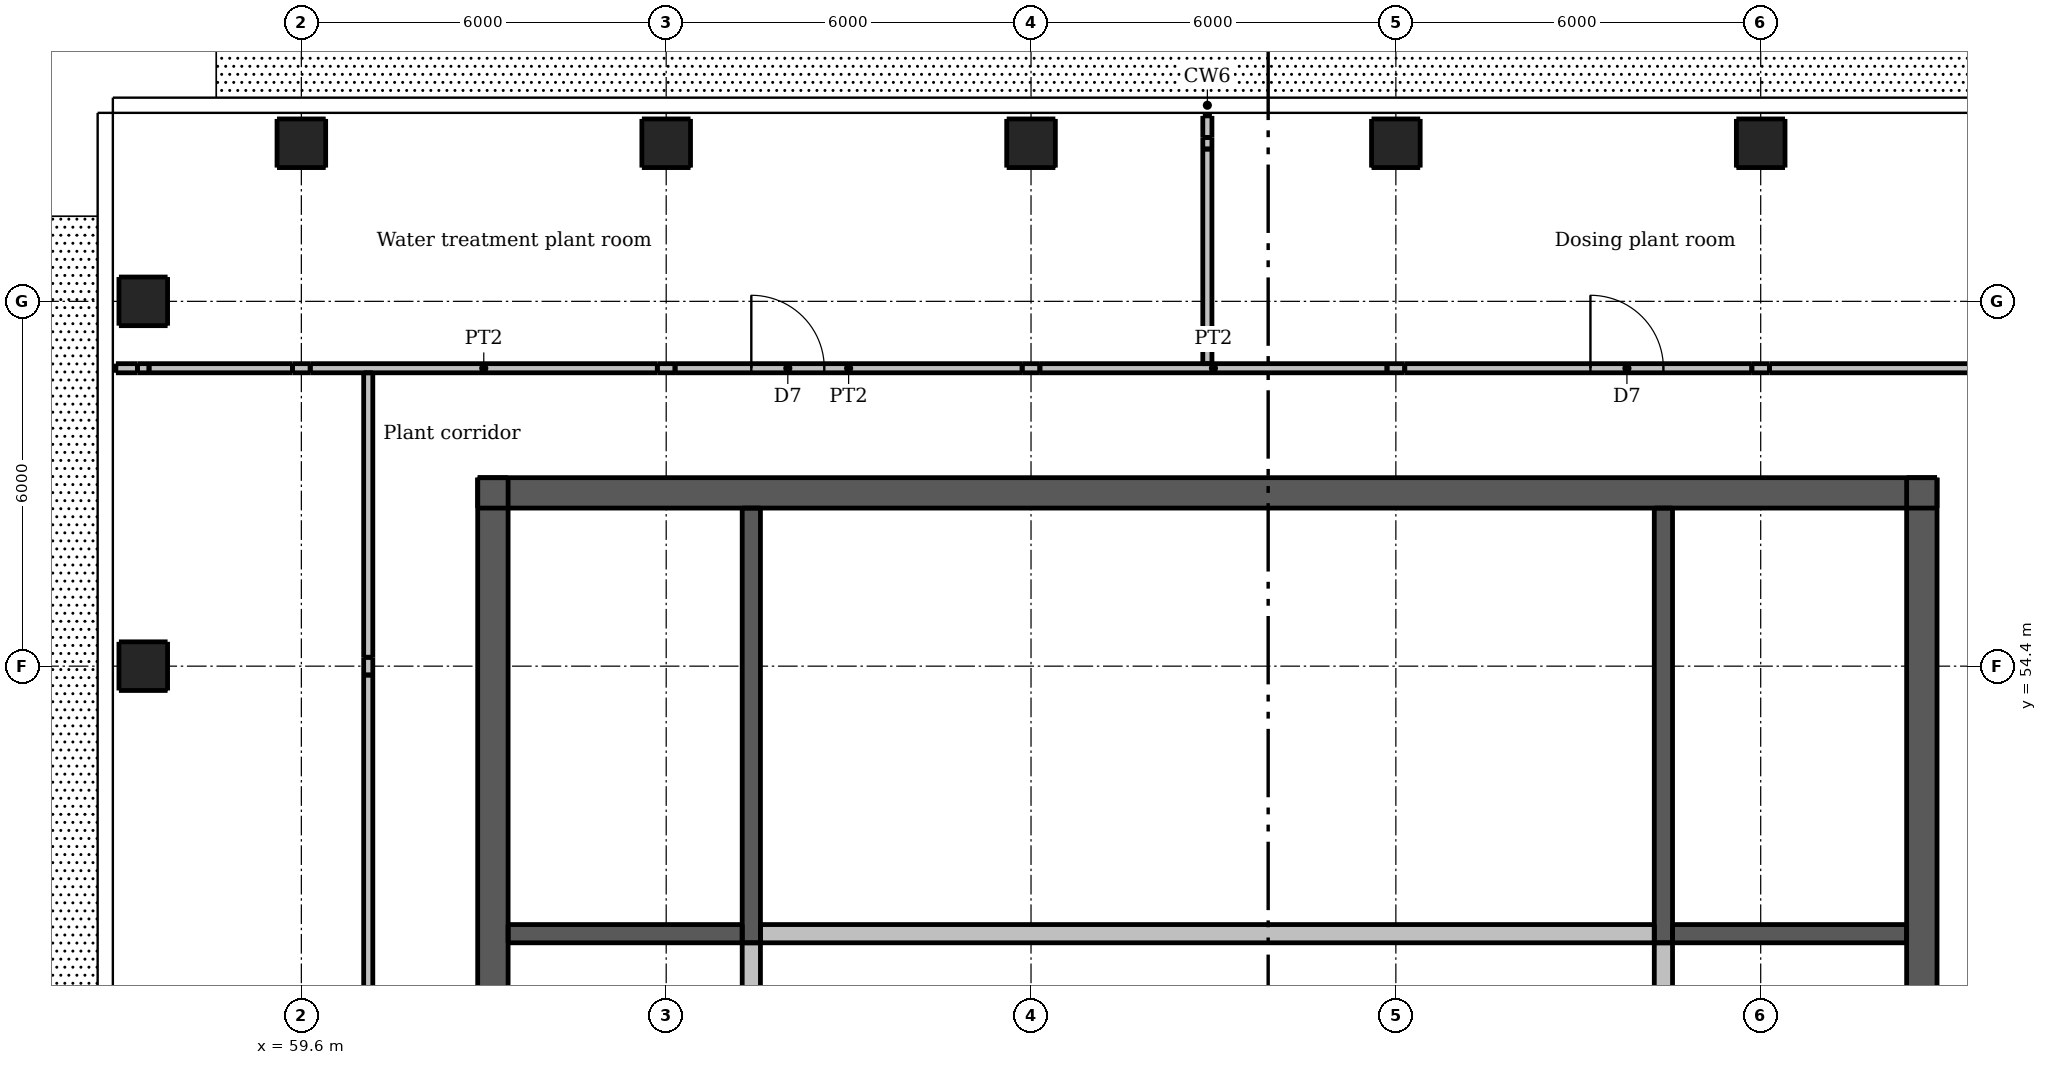
"""IFC4 building model, lengths in metres.
Left out: names, types, materials, properties, quantities, classifications, styles, units other than length and angle.
Written with IfcOpenShell. Run it as: python <this file> out.ifc"""

import sys

from ifc_helpers import new_model, si_unit, direction, frame, frame_2d, origin, origin_2d, place, context, subcontext, project, spatial, rectangle, extrude, element, fill, save


model = new_model("IFC4")
c1 = context("Model", 3, precision=1e-05, world=origin(), true_north=direction((0.0, 1.0)))
c2 = subcontext(c1, "Body", "Model", "MODEL_VIEW")
j1 = project(units=[si_unit("LENGTHUNIT", "METRE"), si_unit("PLANEANGLEUNIT", "RADIAN")], contexts=[c1])
p1 = place(None, origin())
s1 = spatial("IfcSite", under=j1, at=p1, CompositionType="ELEMENT")
p2 = place(p1, origin())
s2 = spatial("IfcBuilding", under=s1, at=p2, CompositionType="ELEMENT")
p3 = place(p2, frame((0.0, 0.0, 290.8)))
s3 = spatial("IfcBuildingStorey", under=s2, at=p3, CompositionType="ELEMENT", Elevation=290.8)
p4 = place(p3, frame((62.5, 57.25, 0.0), z_axis=(0.0, 0.0, 1.0), x_axis=(1.0, 0.0, 0.0)))
e1 = element("IfcWall", 1, at=p4, inside=s3, PredefinedType="SHEAR", context=c2, shape_type="SweptSolid", body=[
    extrude(rectangle(XDim=24.0, YDim=0.5, at=frame_2d((12.0, 0.0))), origin(), (0.0, 0.0, 1.0), 3.3),
])
p5 = place(p4, frame((21.025, 0.0, 0.0)))
e2 = element("IfcOpeningElement", 2, at=p5, cuts=e1, PredefinedType="OPENING", context=c2, shape_type="SweptSolid", body=[
    extrude(rectangle(XDim=1.1, YDim=2.1, at=frame_2d((0.55, 1.05))), frame((0.0, 0.26, 0.0), z_axis=(0.0, -1.0, 0.0), x_axis=(1.0, 0.0, 0.0)), (0.0, 0.0, 1.0), 0.52),
])
p6 = place(p4, frame((1.875, 0.0, 0.0)))
e3 = element("IfcOpeningElement", 3, at=p6, cuts=e1, PredefinedType="OPENING", context=c2, shape_type="SweptSolid", body=[
    extrude(rectangle(XDim=1.1, YDim=2.1, at=frame_2d((0.55, 1.05))), frame((0.0, 0.26, 0.0), z_axis=(0.0, -1.0, 0.0), x_axis=(1.0, 0.0, 0.0)), (0.0, 0.0, 1.0), 0.52),
])
p7 = place(p4, frame((11.55, 0.0, 0.0)))
e4 = element("IfcOpeningElement", 4, at=p7, cuts=e1, PredefinedType="OPENING", context=c2, shape_type="SweptSolid", body=[
    extrude(rectangle(XDim=0.9, YDim=2.1, at=frame_2d((0.45, 1.05))), frame((0.0, 0.26, 0.0), z_axis=(0.0, -1.0, 0.0), x_axis=(1.0, 0.0, 0.0)), (0.0, 0.0, 1.0), 0.52),
])
p8 = place(p3, frame((62.75, 33.5, 0.0), z_axis=(0.0, 0.0, 1.0), x_axis=(0.0, 1.0, 0.0)))
e5 = element("IfcWall", 5, at=p8, inside=s3, PredefinedType="SHEAR", context=c2, shape_type="SweptSolid", body=[
    extrude(rectangle(XDim=24.0, YDim=0.5, at=frame_2d((12.0, 0.0))), origin(), (0.0, 0.0, 1.0), 3.3),
])
p9 = place(p8, frame((11.55, 0.0, 0.0)))
e6 = element("IfcOpeningElement", 6, at=p9, cuts=e5, PredefinedType="OPENING", context=c2, shape_type="SweptSolid", body=[
    extrude(rectangle(XDim=0.9, YDim=2.1, at=frame_2d((0.45, 1.05))), frame((0.0, 0.26, 0.0), z_axis=(0.0, -1.0, 0.0), x_axis=(1.0, 0.0, 0.0)), (0.0, 0.0, 1.0), 0.52),
])
p10 = place(p3, frame((86.25, 33.5, 0.0), z_axis=(0.0, 0.0, 1.0), x_axis=(0.0, 1.0, 0.0)))
e7 = element("IfcWall", 7, at=p10, inside=s3, PredefinedType="SHEAR", context=c2, shape_type="SweptSolid", body=[
    extrude(rectangle(XDim=24.0, YDim=0.5, at=frame_2d((12.0, 0.0))), origin(), (0.0, 0.0, 1.0), 3.3),
])
p11 = place(p10, frame((11.55, 0.0, 0.0)))
e8 = element("IfcOpeningElement", 8, at=p11, cuts=e7, PredefinedType="OPENING", context=c2, shape_type="SweptSolid", body=[
    extrude(rectangle(XDim=0.9, YDim=2.1, at=frame_2d((0.45, 1.05))), frame((0.0, 0.26, 0.0), z_axis=(0.0, -1.0, 0.0), x_axis=(1.0, 0.0, 0.0)), (0.0, 0.0, 1.0), 0.52),
])
for number, where, z_axis, x_axis in (
    (9, (59.6, 63.0, 0.0), (0.0, 0.0, 1.0), (1.0, 0.0, 0.0)),
    (10, (65.6, 63.0, 0.0), (0.0, 0.0, 1.0), (1.0, 0.0, 0.0)),
    (11, (71.6, 63.0, 0.0), (0.0, 0.0, 1.0), (1.0, 0.0, 0.0)),
    (12, (77.6, 63.0, 0.0), (0.0, 0.0, 1.0), (1.0, 0.0, 0.0)),
    (13, (83.6, 63.0, 0.0), (0.0, 0.0, 1.0), (1.0, 0.0, 0.0)),
    (14, (57.0, 54.4, 0.0), (0.0, 0.0, 1.0), (1.0, 0.0, 0.0)),
    (15, (57.0, 60.4, 0.0), (0.0, 0.0, 1.0), (1.0, 0.0, 0.0)),
):
    element("IfcColumn", number, at=place(p3, frame(where, z_axis=z_axis, x_axis=x_axis)), inside=s3, PredefinedType="COLUMN", context=c2, shape_type="SweptSolid", body=[
        extrude(rectangle(XDim=0.8, YDim=0.8, at=origin_2d()), origin(), (0.0, 0.0, 1.0), 3.3),
    ])
p12 = place(p3, frame((67.0, 41.15, 0.0), z_axis=(0.0, 0.0, 1.0), x_axis=(0.0, 1.0, 0.0)))
e16 = element("IfcWall", 16, at=p12, inside=s3, PredefinedType="PARTITIONING", context=c2, shape_type="SweptSolid", body=[
    extrude(rectangle(XDim=8.7, YDim=0.3, at=frame_2d((4.35, 0.0))), origin(), (0.0, 0.0, 1.0), 3.3),
])
p13 = place(p12, frame((3.9, 0.0, 0.0)))
e17 = element("IfcOpeningElement", 17, at=p13, cuts=e16, PredefinedType="OPENING", context=c2, shape_type="SweptSolid", body=[
    extrude(rectangle(XDim=0.9, YDim=2.1, at=frame_2d((0.45, 1.05))), frame((0.0, 0.16, 0.0), z_axis=(0.0, -1.0, 0.0), x_axis=(1.0, 0.0, 0.0)), (0.0, 0.0, 1.0), 0.32),
])
p14 = place(p3, frame((67.0, 49.85, 0.0), z_axis=(0.0, 0.0, 1.0), x_axis=(0.0, 1.0, 0.0)))
e18 = element("IfcWall", 18, at=p14, inside=s3, PredefinedType="SHEAR", context=c2, shape_type="SweptSolid", body=[
    extrude(rectangle(XDim=7.15, YDim=0.3, at=frame_2d((3.575, 0.0))), origin(), (0.0, 0.0, 1.0), 3.3),
])
p15 = place(p14, frame((5.85, 0.0, 0.0)))
e19 = element("IfcOpeningElement", 19, at=p15, cuts=e18, PredefinedType="OPENING", context=c2, shape_type="SweptSolid", body=[
    extrude(rectangle(XDim=1.1, YDim=2.1, at=frame_2d((0.55, 1.05))), frame((0.0, 0.16, 0.0), z_axis=(0.0, -1.0, 0.0), x_axis=(1.0, 0.0, 0.0)), (0.0, 0.0, 1.0), 0.32),
])
p16 = place(p3, frame((82.0, 41.15, 0.0), z_axis=(0.0, 0.0, 1.0), x_axis=(0.0, 1.0, 0.0)))
e20 = element("IfcWall", 20, at=p16, inside=s3, PredefinedType="PARTITIONING", context=c2, shape_type="SweptSolid", body=[
    extrude(rectangle(XDim=8.7, YDim=0.3, at=frame_2d((4.35, 0.0))), origin(), (0.0, 0.0, 1.0), 3.3),
])
p17 = place(p16, frame((3.9, 0.0, 0.0)))
e21 = element("IfcOpeningElement", 21, at=p17, cuts=e20, PredefinedType="OPENING", context=c2, shape_type="SweptSolid", body=[
    extrude(rectangle(XDim=0.9, YDim=2.1, at=frame_2d((0.45, 1.05))), frame((0.0, 0.16, 0.0), z_axis=(0.0, -1.0, 0.0), x_axis=(1.0, 0.0, 0.0)), (0.0, 0.0, 1.0), 0.32),
])
p18 = place(p3, frame((82.0, 49.85, 0.0), z_axis=(0.0, 0.0, 1.0), x_axis=(0.0, 1.0, 0.0)))
e22 = element("IfcWall", 22, at=p18, inside=s3, PredefinedType="SHEAR", context=c2, shape_type="SweptSolid", body=[
    extrude(rectangle(XDim=7.15, YDim=0.3, at=frame_2d((3.575, 0.0))), origin(), (0.0, 0.0, 1.0), 3.3),
])
p19 = place(p18, frame((5.85, 0.0, 0.0)))
e23 = element("IfcOpeningElement", 23, at=p19, cuts=e22, PredefinedType="OPENING", context=c2, shape_type="SweptSolid", body=[
    extrude(rectangle(XDim=1.1, YDim=2.1, at=frame_2d((0.55, 1.05))), frame((0.0, 0.16, 0.0), z_axis=(0.0, -1.0, 0.0), x_axis=(1.0, 0.0, 0.0)), (0.0, 0.0, 1.0), 0.32),
])
for number, where, z_axis, x_axis in (
    (24, (63.0, 50.0, 0.0), (0.0, 0.0, 1.0), (1.0, 0.0, 0.0)),
    (25, (82.15, 50.0, 0.0), (0.0, 0.0, 1.0), (1.0, 0.0, 0.0)),
):
    element("IfcWall", number, at=place(p3, frame(where, z_axis=z_axis, x_axis=x_axis)), inside=s3, PredefinedType="SHEAR", context=c2, shape_type="SweptSolid", body=[
        extrude(rectangle(XDim=3.85, YDim=0.3, at=frame_2d((1.925, 0.0))), origin(), (0.0, 0.0, 1.0), 3.3),
    ])
p20 = place(p3, frame((67.15, 50.0, 0.0), z_axis=(0.0, 0.0, 1.0), x_axis=(1.0, 0.0, 0.0)))
e26 = element("IfcWall", 26, at=p20, inside=s3, PredefinedType="PARTITIONING", context=c2, shape_type="SweptSolid", body=[
    extrude(rectangle(XDim=14.7, YDim=0.3, at=frame_2d((7.35, 0.0))), origin(), (0.0, 0.0, 1.0), 3.3),
])
p21 = place(p20, frame((6.9, 0.0, 0.0)))
e27 = element("IfcOpeningElement", 27, at=p21, cuts=e26, PredefinedType="OPENING", context=c2, shape_type="SweptSolid", body=[
    extrude(rectangle(XDim=0.9, YDim=2.1, at=frame_2d((0.45, 1.05))), frame((0.0, 0.16, 0.0), z_axis=(0.0, -1.0, 0.0), x_axis=(1.0, 0.0, 0.0)), (0.0, 0.0, 1.0), 0.32),
])
p22 = place(p3, frame((56.55, 59.3, 0.0), z_axis=(0.0, 0.0, 1.0), x_axis=(1.0, 0.0, 0.0)))
e28 = element("IfcWall", 28, at=p22, inside=s3, PredefinedType="PARTITIONING", context=c2, shape_type="SweptSolid", body=[
    extrude(rectangle(XDim=0.355, YDim=0.15, at=frame_2d((0.177, 0.0))), origin(), (0.0, 0.0, 1.0), 3.3),
])
p23 = place(p3, frame((56.905, 59.3, 0.0), z_axis=(0.0, 0.0, 1.0), x_axis=(1.0, 0.0, 0.0)))
e29 = element("IfcWall", 29, at=p23, inside=s3, PredefinedType="PARTITIONING", context=c2, shape_type="SweptSolid", body=[
    extrude(rectangle(XDim=0.19, YDim=0.15, at=frame_2d((0.095, 0.0))), origin(), (0.0, 0.0, 1.0), 2.847),
])
p24 = place(p3, frame((57.095, 59.3, 0.0), z_axis=(0.0, 0.0, 1.0), x_axis=(1.0, 0.0, 0.0)))
e30 = element("IfcWall", 30, at=p24, inside=s3, PredefinedType="PARTITIONING", context=c2, shape_type="SweptSolid", body=[
    extrude(rectangle(XDim=2.359, YDim=0.15, at=frame_2d((1.18, 0.0))), origin(), (0.0, 0.0, 1.0), 3.3),
])
p25 = place(p3, frame((59.454, 59.3, 0.0), z_axis=(0.0, 0.0, 1.0), x_axis=(1.0, 0.0, 0.0)))
e31 = element("IfcWall", 31, at=p25, inside=s3, PredefinedType="PARTITIONING", context=c2, shape_type="SweptSolid", body=[
    extrude(rectangle(XDim=0.292, YDim=0.15, at=frame_2d((0.146, 0.0))), origin(), (0.0, 0.0, 1.0), 2.462),
])
p26 = place(p3, frame((59.746, 59.3, 0.0), z_axis=(0.0, 0.0, 1.0), x_axis=(1.0, 0.0, 0.0)))
e32 = element("IfcWall", 32, at=p26, inside=s3, PredefinedType="PARTITIONING", context=c2, shape_type="SweptSolid", body=[
    extrude(rectangle(XDim=5.708, YDim=0.15, at=frame_2d((2.854, 0.0))), origin(), (0.0, 0.0, 1.0), 3.3),
])
p27 = place(p3, frame((65.454, 59.3, 0.0), z_axis=(0.0, 0.0, 1.0), x_axis=(1.0, 0.0, 0.0)))
e33 = element("IfcWall", 33, at=p27, inside=s3, PredefinedType="PARTITIONING", context=c2, shape_type="SweptSolid", body=[
    extrude(rectangle(XDim=0.292, YDim=0.15, at=frame_2d((0.146, 0.0))), origin(), (0.0, 0.0, 1.0), 2.465),
])
p28 = place(p3, frame((65.746, 59.3, 0.0), z_axis=(0.0, 0.0, 1.0), x_axis=(1.0, 0.0, 0.0)))
e34 = element("IfcWall", 34, at=p28, inside=s3, PredefinedType="PARTITIONING", context=c2, shape_type="SweptSolid", body=[
    extrude(rectangle(XDim=5.708, YDim=0.15, at=frame_2d((2.854, 0.0))), origin(), (0.0, 0.0, 1.0), 3.3),
])
p29 = place(p28, frame((1.254, 0.0, 0.0)))
e35 = element("IfcOpeningElement", 35, at=p29, cuts=e34, PredefinedType="OPENING", context=c2, shape_type="SweptSolid", body=[
    extrude(rectangle(XDim=1.2, YDim=2.1, at=frame_2d((0.6, 1.05))), frame((0.0, 0.085, 0.0), z_axis=(0.0, -1.0, 0.0), x_axis=(1.0, 0.0, 0.0)), (0.0, 0.0, 1.0), 0.17),
])
p30 = place(p3, frame((71.454, 59.3, 0.0), z_axis=(0.0, 0.0, 1.0), x_axis=(1.0, 0.0, 0.0)))
e36 = element("IfcWall", 36, at=p30, inside=s3, PredefinedType="PARTITIONING", context=c2, shape_type="SweptSolid", body=[
    extrude(rectangle(XDim=0.292, YDim=0.15, at=frame_2d((0.146, 0.0))), origin(), (0.0, 0.0, 1.0), 2.465),
])
p31 = place(p3, frame((71.746, 59.3, 0.0), z_axis=(0.0, 0.0, 1.0), x_axis=(1.0, 0.0, 0.0)))
e37 = element("IfcWall", 37, at=p31, inside=s3, PredefinedType="PARTITIONING", context=c2, shape_type="SweptSolid", body=[
    extrude(rectangle(XDim=5.708, YDim=0.15, at=frame_2d((2.854, 0.0))), origin(), (0.0, 0.0, 1.0), 3.3),
])
p32 = place(p3, frame((77.454, 59.3, 0.0), z_axis=(0.0, 0.0, 1.0), x_axis=(1.0, 0.0, 0.0)))
e38 = element("IfcWall", 38, at=p32, inside=s3, PredefinedType="PARTITIONING", context=c2, shape_type="SweptSolid", body=[
    extrude(rectangle(XDim=0.292, YDim=0.15, at=frame_2d((0.146, 0.0))), origin(), (0.0, 0.0, 1.0), 2.465),
])
p33 = place(p3, frame((77.746, 59.3, 0.0), z_axis=(0.0, 0.0, 1.0), x_axis=(1.0, 0.0, 0.0)))
e39 = element("IfcWall", 39, at=p33, inside=s3, PredefinedType="PARTITIONING", context=c2, shape_type="SweptSolid", body=[
    extrude(rectangle(XDim=5.708, YDim=0.15, at=frame_2d((2.854, 0.0))), origin(), (0.0, 0.0, 1.0), 3.3),
])
p34 = place(p33, frame((3.054, 0.0, 0.0)))
e40 = element("IfcOpeningElement", 40, at=p34, cuts=e39, PredefinedType="OPENING", context=c2, shape_type="SweptSolid", body=[
    extrude(rectangle(XDim=1.2, YDim=2.1, at=frame_2d((0.6, 1.05))), frame((0.0, 0.085, 0.0), z_axis=(0.0, -1.0, 0.0), x_axis=(1.0, 0.0, 0.0)), (0.0, 0.0, 1.0), 0.17),
])
p35 = place(p3, frame((83.454, 59.3, 0.0), z_axis=(0.0, 0.0, 1.0), x_axis=(1.0, 0.0, 0.0)))
e41 = element("IfcWall", 41, at=p35, inside=s3, PredefinedType="PARTITIONING", context=c2, shape_type="SweptSolid", body=[
    extrude(rectangle(XDim=0.292, YDim=0.15, at=frame_2d((0.146, 0.0))), origin(), (0.0, 0.0, 1.0), 2.465),
])
p36 = place(p3, frame((83.746, 59.3, 0.0), z_axis=(0.0, 0.0, 1.0), x_axis=(1.0, 0.0, 0.0)))
e42 = element("IfcWall", 42, at=p36, inside=s3, PredefinedType="PARTITIONING", context=c2, shape_type="SweptSolid", body=[
    extrude(rectangle(XDim=4.708, YDim=0.15, at=frame_2d((2.354, 0.0))), origin(), (0.0, 0.0, 1.0), 3.3),
])
p37 = place(p3, frame((60.7, 48.546, 0.0), z_axis=(0.0, 0.0, 1.0), x_axis=(0.0, 1.0, 0.0)))
e43 = element("IfcWall", 43, at=p37, inside=s3, PredefinedType="PARTITIONING", context=c2, shape_type="SweptSolid", body=[
    extrude(rectangle(XDim=5.708, YDim=0.15, at=frame_2d((2.854, 0.0))), origin(), (0.0, 0.0, 1.0), 3.3),
])
p38 = place(p3, frame((60.7, 54.254, 0.0), z_axis=(0.0, 0.0, 1.0), x_axis=(0.0, 1.0, 0.0)))
e44 = element("IfcWall", 44, at=p38, inside=s3, PredefinedType="PARTITIONING", context=c2, shape_type="SweptSolid", body=[
    extrude(rectangle(XDim=0.292, YDim=0.15, at=frame_2d((0.146, 0.0))), origin(), (0.0, 0.0, 1.0), 2.459),
])
p39 = place(p3, frame((60.7, 54.546, 0.0), z_axis=(0.0, 0.0, 1.0), x_axis=(0.0, 1.0, 0.0)))
e45 = element("IfcWall", 45, at=p39, inside=s3, PredefinedType="PARTITIONING", context=c2, shape_type="SweptSolid", body=[
    extrude(rectangle(XDim=4.679, YDim=0.15, at=frame_2d((2.34, 0.0))), origin(), (0.0, 0.0, 1.0), 3.3),
])
p40 = place(p3, frame((74.5, 59.375, 0.0), z_axis=(0.0, 0.0, 1.0), x_axis=(0.0, 1.0, 0.0)))
e46 = element("IfcWall", 46, at=p40, inside=s3, PredefinedType="PARTITIONING", context=c2, shape_type="SweptSolid", body=[
    extrude(rectangle(XDim=3.53, YDim=0.15, at=frame_2d((1.765, 0.0))), origin(), (0.0, 0.0, 1.0), 3.3),
])
p41 = place(p3, frame((74.5, 62.905, 0.0), z_axis=(0.0, 0.0, 1.0), x_axis=(0.0, 1.0, 0.0)))
e47 = element("IfcWall", 47, at=p41, inside=s3, PredefinedType="PARTITIONING", context=c2, shape_type="SweptSolid", body=[
    extrude(rectangle(XDim=0.19, YDim=0.15, at=frame_2d((0.095, 0.0))), origin(), (0.0, 0.0, 1.0), 2.847),
])
p42 = place(p3, frame((74.5, 63.095, 0.0), z_axis=(0.0, 0.0, 1.0), x_axis=(0.0, 1.0, 0.0)))
e48 = element("IfcWall", 48, at=p42, inside=s3, PredefinedType="PARTITIONING", context=c2, shape_type="SweptSolid", body=[
    extrude(rectangle(XDim=0.355, YDim=0.15, at=frame_2d((0.177, 0.0))), origin(), (0.0, 0.0, 1.0), 3.3),
])
p43 = place(p15, origin())
e49 = element("IfcDoor", 49, at=p43, inside=s3, OperationType="SINGLE_SWING_LEFT", PredefinedType="DOOR", context=c2, shape_type="SweptSolid", body=[
    extrude(rectangle(XDim=1.1, YDim=2.1, at=frame_2d((0.55, 1.05))), frame((0.0, 0.138, 0.0), z_axis=(0.0, -1.0, 0.0), x_axis=(1.0, 0.0, 0.0)), (0.0, 0.0, 1.0), 0.05),
])
fill(e19, e49)
p44 = place(p19, origin())
e50 = element("IfcDoor", 50, at=p44, inside=s3, OperationType="SINGLE_SWING_RIGHT", PredefinedType="DOOR", context=c2, shape_type="SweptSolid", body=[
    extrude(rectangle(XDim=1.1, YDim=2.1, at=frame_2d((0.55, 1.05))), frame((0.0, -0.087, 0.0), z_axis=(0.0, -1.0, 0.0), x_axis=(1.0, 0.0, 0.0)), (0.0, 0.0, 1.0), 0.05),
])
fill(e23, e50)
p45 = place(p21, origin())
e51 = element("IfcDoor", 51, at=p45, inside=s3, OperationType="SINGLE_SWING_RIGHT", PredefinedType="DOOR", context=c2, shape_type="SweptSolid", body=[
    extrude(rectangle(XDim=0.9, YDim=2.1, at=frame_2d((0.45, 1.05))), frame((0.0, -0.087, 0.0), z_axis=(0.0, -1.0, 0.0), x_axis=(1.0, 0.0, 0.0)), (0.0, 0.0, 1.0), 0.05),
])
fill(e27, e51)
p46 = place(p5, origin())
e52 = element("IfcDoor", 52, at=p46, inside=s3, OperationType="SINGLE_SWING_RIGHT", PredefinedType="DOOR", context=c2, shape_type="SweptSolid", body=[
    extrude(rectangle(XDim=1.1, YDim=2.1, at=frame_2d((0.55, 1.05))), frame((0.0, -0.188, 0.0), z_axis=(0.0, -1.0, 0.0), x_axis=(1.0, 0.0, 0.0)), (0.0, 0.0, 1.0), 0.05),
])
fill(e2, e52)
p47 = place(p6, origin())
e53 = element("IfcDoor", 53, at=p47, inside=s3, OperationType="SINGLE_SWING_LEFT", PredefinedType="DOOR", context=c2, shape_type="SweptSolid", body=[
    extrude(rectangle(XDim=1.1, YDim=2.1, at=frame_2d((0.55, 1.05))), frame((0.0, -0.188, 0.0), z_axis=(0.0, -1.0, 0.0), x_axis=(1.0, 0.0, 0.0)), (0.0, 0.0, 1.0), 0.05),
])
fill(e3, e53)
p48 = place(p7, origin())
e54 = element("IfcDoor", 54, at=p48, inside=s3, OperationType="SINGLE_SWING_RIGHT", PredefinedType="DOOR", context=c2, shape_type="SweptSolid", body=[
    extrude(rectangle(XDim=0.9, YDim=2.1, at=frame_2d((0.45, 1.05))), frame((0.0, -0.188, 0.0), z_axis=(0.0, -1.0, 0.0), x_axis=(1.0, 0.0, 0.0)), (0.0, 0.0, 1.0), 0.05),
])
fill(e4, e54)
p49 = place(p29, origin())
e55 = element("IfcDoor", 55, at=p49, inside=s3, OperationType="SINGLE_SWING_LEFT", PredefinedType="DOOR", context=c2, shape_type="SweptSolid", body=[
    extrude(rectangle(XDim=1.2, YDim=2.1, at=frame_2d((0.6, 1.05))), frame((0.0, 0.025, 0.0), z_axis=(0.0, -1.0, 0.0), x_axis=(1.0, 0.0, 0.0)), (0.0, 0.0, 1.0), 0.05),
])
fill(e35, e55)
p50 = place(p34, origin())
e56 = element("IfcDoor", 56, at=p50, inside=s3, OperationType="SINGLE_SWING_LEFT", PredefinedType="DOOR", context=c2, shape_type="SweptSolid", body=[
    extrude(rectangle(XDim=1.2, YDim=2.1, at=frame_2d((0.6, 1.05))), frame((0.0, 0.025, 0.0), z_axis=(0.0, -1.0, 0.0), x_axis=(1.0, 0.0, 0.0)), (0.0, 0.0, 1.0), 0.05),
])
fill(e40, e56)
save(model, sys.argv[1])
